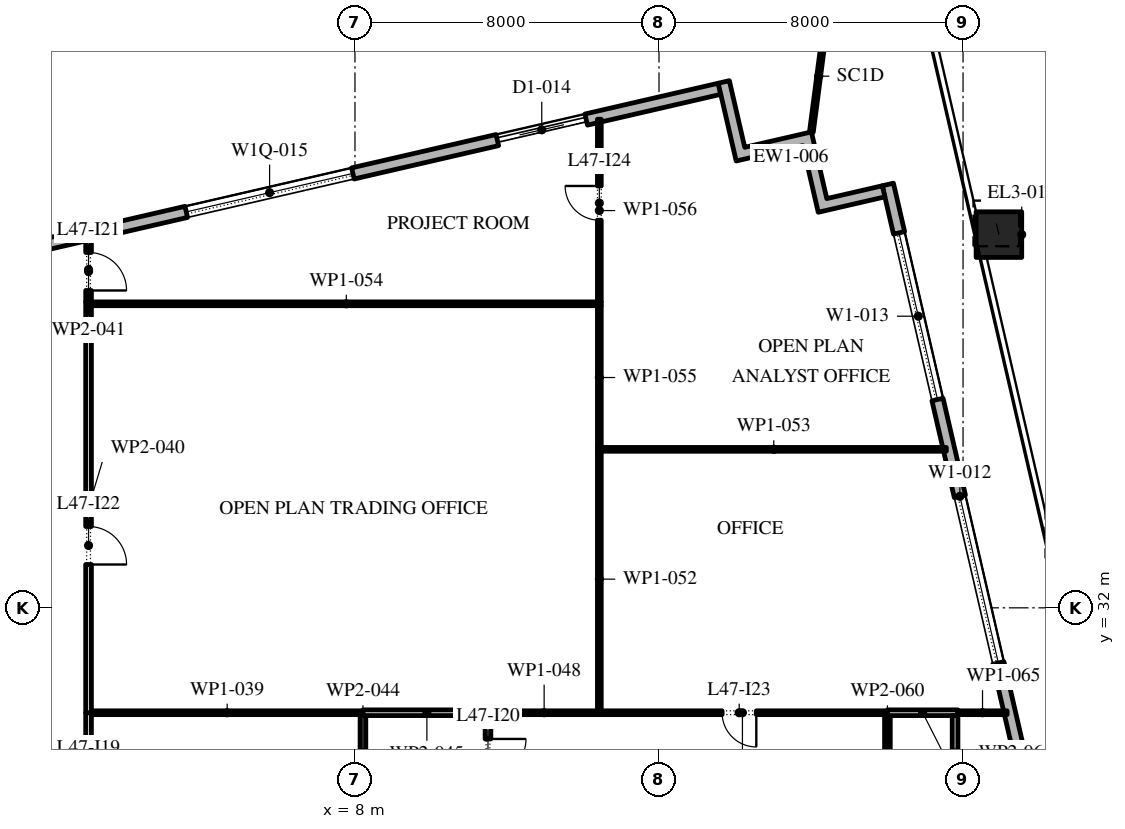
"""IFC4 building model, lengths in metres.
Left out: names, types, materials, properties, quantities, classifications, styles, units other than length and angle.
Written with IfcOpenShell. Run it as: python <this file> out.ifc"""

import sys

from ifc_helpers import new_model, si_unit, direction, frame, frame_2d, origin, origin_2d, place, context, subcontext, project, spatial, polyline, rectangle, outline, extrude, element, fill, save


model = new_model("IFC4")
c1 = context("Model", 3, precision=1e-05, world=origin(), true_north=direction((0.0, 1.0)))
c2 = subcontext(c1, "Body", "Model", "MODEL_VIEW")
j1 = project(units=[si_unit("LENGTHUNIT", "METRE"), si_unit("PLANEANGLEUNIT", "RADIAN")], contexts=[c1])
p1 = place(None, origin())
s1 = spatial("IfcSite", under=j1, at=p1, CompositionType="ELEMENT")
p2 = place(p1, origin())
s2 = spatial("IfcBuilding", under=s1, at=p2, CompositionType="ELEMENT")
p3 = place(p2, frame((0.0, 0.0, 213.6)))
s3 = spatial("IfcBuildingStorey", under=s2, at=p3, CompositionType="ELEMENT", Elevation=213.6)
p4 = place(p3, frame((26.828, 33.658, 0.0), z_axis=(-0.013461799865, 0.058373149415, 0.998204064995), x_axis=(-0.974423835271, -0.224718021653, 0.0)))
e1 = element("IfcColumn", 1, at=p4, inside=s3, PredefinedType="COLUMN", context=c2, shape_type="SweptSolid", body=[
    extrude(rectangle(XDim=1.2, YDim=1.2, at=origin_2d()), origin(), (0.0, 0.0, 1.0), 4.208),
])
p5 = place(p3, frame((24.944, 41.82, 0.0), z_axis=(-0.016118248597, 0.069981028979, 0.997418095708), x_axis=(-0.974486358888, -0.224446733862, 0.0)))
e2 = element("IfcColumn", 2, at=p5, inside=s3, PredefinedType="COLUMN", context=c2, shape_type="SweptSolid", body=[
    extrude(rectangle(XDim=1.2, YDim=1.2, at=origin_2d()), origin(), (0.0, 0.0, 1.0), 4.211),
])
p6 = place(p3, frame((33.157, -5.092, 0.0), z_axis=(0.0, 0.0, 1.0), x_axis=(-0.224950279389, 0.974370243697, 0.0)))
e3 = element("IfcWall", 3, at=p6, inside=s3, PredefinedType="STANDARD", context=c2, shape_type="SweptSolid", body=[
    extrude(rectangle(XDim=49.5, YDim=0.3, at=frame_2d((24.75, 0.0))), origin(), (0.0, 0.0, 1.0), 4.0),
])
p7 = place(p6, frame((2.207, 0.0, 0.0)))
e4 = element("IfcOpeningElement", 4, at=p7, cuts=e3, PredefinedType="OPENING", context=c2, shape_type="SweptSolid", body=[
    extrude(rectangle(XDim=2.4, YDim=3.125, at=frame_2d((1.2, 1.562))), frame((0.0, 0.16, 0.0), z_axis=(0.0, -1.0, 0.0), x_axis=(1.0, 0.0, 0.0)), (0.0, 0.0, 1.0), 0.32),
])
p8 = place(p6, frame((8.121, 0.0, 0.45)))
e5 = element("IfcOpeningElement", 5, at=p8, cuts=e3, PredefinedType="OPENING", context=c2, shape_type="SweptSolid", body=[
    extrude(rectangle(XDim=4.5, YDim=2.875, at=frame_2d((2.25, 1.438))), frame((0.0, 0.16, 0.0), z_axis=(0.0, -1.0, 0.0), x_axis=(1.0, 0.0, 0.0)), (0.0, 0.0, 1.0), 0.32),
])
p9 = place(p6, frame((15.236, 0.0, 0.45)))
e6 = element("IfcOpeningElement", 6, at=p9, cuts=e3, PredefinedType="OPENING", context=c2, shape_type="SweptSolid", body=[
    extrude(rectangle(XDim=4.5, YDim=2.875, at=frame_2d((2.25, 1.438))), frame((0.0, 0.16, 0.0), z_axis=(0.0, -1.0, 0.0), x_axis=(1.0, 0.0, 0.0)), (0.0, 0.0, 1.0), 0.32),
])
p10 = place(p6, frame((22.35, 0.0, 0.45)))
e7 = element("IfcOpeningElement", 7, at=p10, cuts=e3, PredefinedType="OPENING", context=c2, shape_type="SweptSolid", body=[
    extrude(rectangle(XDim=4.5, YDim=3.0, at=frame_2d((2.25, 1.5))), frame((0.0, 0.16, 0.0), z_axis=(0.0, -1.0, 0.0), x_axis=(1.0, 0.0, 0.0)), (0.0, 0.0, 1.0), 0.32),
])
p11 = place(p6, frame((30.514, 0.0, 0.0)))
e8 = element("IfcOpeningElement", 8, at=p11, cuts=e3, PredefinedType="OPENING", context=c2, shape_type="SweptSolid", body=[
    extrude(rectangle(XDim=2.4, YDim=3.45, at=frame_2d((1.2, 1.725))), frame((0.0, 0.16, 0.0), z_axis=(0.0, -1.0, 0.0), x_axis=(1.0, 0.0, 0.0)), (0.0, 0.0, 1.0), 0.32),
])
p12 = place(p6, frame((36.579, 0.0, 0.45)))
e9 = element("IfcOpeningElement", 9, at=p12, cuts=e3, PredefinedType="OPENING", context=c2, shape_type="SweptSolid", body=[
    extrude(rectangle(XDim=4.5, YDim=3.05, at=frame_2d((2.25, 1.525))), frame((0.0, 0.16, 0.0), z_axis=(0.0, -1.0, 0.0), x_axis=(1.0, 0.0, 0.0)), (0.0, 0.0, 1.0), 0.32),
])
p13 = place(p6, frame((43.693, 0.0, 0.45)))
e10 = element("IfcOpeningElement", 10, at=p13, cuts=e3, PredefinedType="OPENING", context=c2, shape_type="SweptSolid", body=[
    extrude(rectangle(XDim=4.5, YDim=3.05, at=frame_2d((2.25, 1.525))), frame((0.0, 0.16, 0.0), z_axis=(0.0, -1.0, 0.0), x_axis=(1.0, 0.0, 0.0)), (0.0, 0.0, 1.0), 0.32),
])
p14 = place(p3, frame((17.592, 45.657, 0.0), z_axis=(0.0, 0.0, 1.0), x_axis=(-0.974370243697, -0.224950279389, 0.0)))
e11 = element("IfcWall", 11, at=p14, inside=s3, PredefinedType="STANDARD", context=c2, shape_type="SweptSolid", body=[
    extrude(rectangle(XDim=49.5, YDim=0.3, at=frame_2d((24.75, 0.0))), origin(), (0.0, 0.0, 1.0), 4.0),
])
p15 = place(p14, frame((3.6, 0.0, 0.0)))
e12 = element("IfcOpeningElement", 12, at=p15, cuts=e11, PredefinedType="OPENING", context=c2, shape_type="SweptSolid", body=[
    extrude(rectangle(XDim=2.4, YDim=3.5, at=frame_2d((1.2, 1.75))), frame((0.0, 0.16, 0.0), z_axis=(0.0, -1.0, 0.0), x_axis=(1.0, 0.0, 0.0)), (0.0, 0.0, 1.0), 0.32),
])
p16 = place(p14, frame((9.9, 0.0, 0.45)))
e13 = element("IfcOpeningElement", 13, at=p16, cuts=e11, PredefinedType="OPENING", context=c2, shape_type="SweptSolid", body=[
    extrude(rectangle(XDim=4.5, YDim=2.45, at=frame_2d((2.25, 1.225))), frame((0.0, 0.16, 0.0), z_axis=(0.0, -1.0, 0.0), x_axis=(1.0, 0.0, 0.0)), (0.0, 0.0, 1.0), 0.32),
])
p17 = place(p14, frame((18.2, 0.0, 0.45)))
e14 = element("IfcOpeningElement", 14, at=p17, cuts=e11, PredefinedType="OPENING", context=c2, shape_type="SweptSolid", body=[
    extrude(rectangle(XDim=4.5, YDim=2.45, at=frame_2d((2.25, 1.225))), frame((0.0, 0.16, 0.0), z_axis=(0.0, -1.0, 0.0), x_axis=(1.0, 0.0, 0.0)), (0.0, 0.0, 1.0), 0.32),
])
p18 = place(p14, frame((26.5, 0.0, 0.45)))
e15 = element("IfcOpeningElement", 15, at=p18, cuts=e11, PredefinedType="OPENING", context=c2, shape_type="SweptSolid", body=[
    extrude(rectangle(XDim=4.5, YDim=2.45, at=frame_2d((2.25, 1.225))), frame((0.0, 0.16, 0.0), z_axis=(0.0, -1.0, 0.0), x_axis=(1.0, 0.0, 0.0)), (0.0, 0.0, 1.0), 0.32),
])
p19 = place(p14, frame((35.85, 0.0, 0.0)))
e16 = element("IfcOpeningElement", 16, at=p19, cuts=e11, PredefinedType="OPENING", context=c2, shape_type="SweptSolid", body=[
    extrude(rectangle(XDim=2.4, YDim=3.5, at=frame_2d((1.2, 1.75))), frame((0.0, 0.16, 0.0), z_axis=(0.0, -1.0, 0.0), x_axis=(1.0, 0.0, 0.0)), (0.0, 0.0, 1.0), 0.32),
])
p20 = place(p14, frame((43.1, 0.0, 0.45)))
e17 = element("IfcOpeningElement", 17, at=p20, cuts=e11, PredefinedType="OPENING", context=c2, shape_type="SweptSolid", body=[
    extrude(rectangle(XDim=4.5, YDim=2.575, at=frame_2d((2.25, 1.288))), frame((0.0, 0.16, 0.0), z_axis=(0.0, -1.0, 0.0), x_axis=(1.0, 0.0, 0.0)), (0.0, 0.0, 1.0), 0.32),
])
p21 = place(p3, origin())
e18 = element("IfcWall", 18, at=p21, inside=s3, PredefinedType="STANDARD", context=c2, shape_type="SweptSolid", body=[
    extrude(outline(polyline([(19.785, 44.162), (18.031, 43.757), (17.558, 45.803), (17.851, 45.871), (18.256, 44.117), (20.01, 44.522), (20.414, 42.768), (21.876, 43.105), (21.943, 42.813), (20.19, 42.408), (19.785, 44.162)])), origin(), (0.0, 0.0, 1.0), 4.0),
])
p22 = place(p3, frame((20.01, 44.522, -0.05), z_axis=(0.0, 0.0, 1.0), x_axis=(0.129780065945, 0.991542805169, 0.0)))
e19 = element("IfcWall", 19, at=p22, inside=s3, PredefinedType="STANDARD", context=c2, shape_type="SweptSolid", body=[
    extrude(rectangle(XDim=2.959, YDim=0.1, at=frame_2d((1.479, 0.0))), origin(), (0.0, 0.0, 1.0), 3.07),
])
p23 = place(p3, frame((0.99, 29.24, 0.0), z_axis=(0.0, 0.0, 1.0), x_axis=(0.0, -1.0, 0.0)))
e20 = element("IfcWall", 20, at=p23, inside=s3, PredefinedType="PARTITIONING", context=c2, shape_type="SweptSolid", body=[
    extrude(rectangle(XDim=6.93, YDim=0.15, at=frame_2d((3.465, 0.0))), origin(), (0.0, 0.0, 1.0), 4.0),
])
p24 = place(p23, frame((1.53, 0.0, 0.0)))
e21 = element("IfcOpeningElement", 21, at=p24, cuts=e20, PredefinedType="OPENING", context=c2, shape_type="SweptSolid", body=[
    extrude(rectangle(XDim=1.0, YDim=2.1, at=frame_2d((0.5, 1.05))), frame((0.0, 0.085, 0.0), z_axis=(0.0, -1.0, 0.0), x_axis=(1.0, 0.0, 0.0)), (0.0, 0.0, 1.0), 0.17),
])
p25 = place(p3, frame((1.065, 29.24, 0.0), z_axis=(0.0, 0.0, 1.0), x_axis=(1.0, 0.0, 0.0)))
e22 = element("IfcWall", 22, at=p25, inside=s3, PredefinedType="PARTITIONING", context=c2, shape_type="SweptSolid", body=[
    extrude(rectangle(XDim=7.145, YDim=0.1, at=frame_2d((3.573, 0.0))), origin(), (0.0, 0.0, 1.0), 4.0),
])
p26 = place(p3, frame((0.99, 40.05, 0.0), z_axis=(0.0, 0.0, 1.0), x_axis=(0.0, -1.0, 0.0)))
e23 = element("IfcWall", 23, at=p26, inside=s3, PredefinedType="PARTITIONING", context=c2, shape_type="SweptSolid", body=[
    extrude(rectangle(XDim=10.81, YDim=0.15, at=frame_2d((5.405, 0.0))), origin(), (0.0, 0.0, 1.0), 4.0),
])
p27 = place(p26, frame((5.91, 0.0, 0.0)))
e24 = element("IfcOpeningElement", 24, at=p27, cuts=e23, PredefinedType="OPENING", context=c2, shape_type="SweptSolid", body=[
    extrude(rectangle(XDim=1.0, YDim=2.1, at=frame_2d((0.5, 1.05))), frame((0.0, 0.085, 0.0), z_axis=(0.0, -1.0, 0.0), x_axis=(1.0, 0.0, 0.0)), (0.0, 0.0, 1.0), 0.17),
])
p28 = place(p3, frame((0.99, 41.753, 0.0), z_axis=(0.0, 0.0, 1.0), x_axis=(0.0, -1.0, 0.0)))
e25 = element("IfcWall", 25, at=p28, inside=s3, PredefinedType="PARTITIONING", context=c2, shape_type="SweptSolid", body=[
    extrude(rectangle(XDim=1.703, YDim=0.15, at=frame_2d((0.852, 0.0))), origin(), (0.0, 0.0, 1.0), 4.0),
])
p29 = place(p28, frame((0.403, 0.0, 0.0)))
e26 = element("IfcOpeningElement", 26, at=p29, cuts=e25, PredefinedType="OPENING", context=c2, shape_type="SweptSolid", body=[
    extrude(rectangle(XDim=1.0, YDim=2.1, at=frame_2d((0.5, 1.05))), frame((0.0, 0.085, 0.0), z_axis=(0.0, -1.0, 0.0), x_axis=(1.0, 0.0, 0.0)), (0.0, 0.0, 1.0), 0.17),
])
p30 = place(p3, frame((8.21, 27.2, 0.0), z_axis=(0.0, 0.0, 1.0), x_axis=(0.0, 1.0, 0.0)))
e27 = element("IfcWall", 27, at=p30, inside=s3, PredefinedType="PARTITIONING", context=c2, shape_type="SweptSolid", body=[
    extrude(rectangle(XDim=1.99, YDim=0.15, at=frame_2d((0.995, 0.0))), origin(), (0.0, 0.0, 1.0), 4.0),
])
p31 = place(p3, frame((8.21, 29.24, 0.0), z_axis=(0.0, 0.0, 1.0), x_axis=(1.0, 0.0, 0.0)))
e28 = element("IfcWall", 28, at=p31, inside=s3, PredefinedType="PARTITIONING", context=c2, shape_type="SweptSolid", body=[
    extrude(rectangle(XDim=3.365, YDim=0.15, at=frame_2d((1.683, 0.0))), origin(), (0.0, 0.0, 1.0), 4.0),
])
p32 = place(p3, frame((11.5, 29.165, 0.0), z_axis=(0.0, 0.0, 1.0), x_axis=(0.0, -1.0, 0.0)))
e29 = element("IfcWall", 29, at=p32, inside=s3, PredefinedType="PARTITIONING", context=c2, shape_type="SweptSolid", body=[
    extrude(rectangle(XDim=3.765, YDim=0.15, at=frame_2d((1.883, 0.0))), origin(), (0.0, 0.0, 1.0), 4.0),
])
p33 = place(p32, frame((0.615, 0.0, 0.0)))
e30 = element("IfcOpeningElement", 30, at=p33, cuts=e29, PredefinedType="OPENING", context=c2, shape_type="SweptSolid", body=[
    extrude(rectangle(XDim=1.0, YDim=2.1, at=frame_2d((0.5, 1.05))), frame((0.0, 0.085, 0.0), z_axis=(0.0, -1.0, 0.0), x_axis=(1.0, 0.0, 0.0)), (0.0, 0.0, 1.0), 0.17),
])
p34 = place(p3, frame((11.575, 29.24, 0.0), z_axis=(0.0, 0.0, 1.0), x_axis=(1.0, 0.0, 0.0)))
e31 = element("IfcWall", 31, at=p34, inside=s3, PredefinedType="PARTITIONING", context=c2, shape_type="SweptSolid", body=[
    extrude(rectangle(XDim=2.805, YDim=0.1, at=frame_2d((1.402, 0.0))), origin(), (0.0, 0.0, 1.0), 4.0),
])
p35 = place(p3, frame((14.38, 29.24, 0.0), z_axis=(0.0, 0.0, 1.0), x_axis=(1.0, 0.0, 0.0)))
e32 = element("IfcWall", 32, at=p35, inside=s3, PredefinedType="PARTITIONING", context=c2, shape_type="SweptSolid", body=[
    extrude(rectangle(XDim=7.63, YDim=0.1, at=frame_2d((3.815, 0.0))), origin(), (0.0, 0.0, 1.0), 4.0),
])
p36 = place(p35, frame((3.28, 0.0, 0.0)))
e33 = element("IfcOpeningElement", 33, at=p36, cuts=e32, PredefinedType="OPENING", context=c2, shape_type="SweptSolid", body=[
    extrude(rectangle(XDim=0.9, YDim=2.1, at=frame_2d((0.45, 1.05))), frame((0.0, 0.06, 0.0), z_axis=(0.0, -1.0, 0.0), x_axis=(1.0, 0.0, 0.0)), (0.0, 0.0, 1.0), 0.12),
])
p37 = place(p3, frame((14.43, 36.22, 0.0), z_axis=(0.0, 0.0, 1.0), x_axis=(0.0, -1.0, 0.0)))
e34 = element("IfcWall", 34, at=p37, inside=s3, PredefinedType="PARTITIONING", context=c2, shape_type="SweptSolid", body=[
    extrude(rectangle(XDim=6.93, YDim=0.1, at=frame_2d((3.465, 0.0))), origin(), (0.0, 0.0, 1.0), 4.0),
])
p38 = place(p3, frame((14.48, 36.17, 0.0), z_axis=(0.0, 0.0, 1.0), x_axis=(1.0, 0.0, 0.0)))
e35 = element("IfcWall", 35, at=p38, inside=s3, PredefinedType="PARTITIONING", context=c2, shape_type="SweptSolid", body=[
    extrude(rectangle(XDim=9.08, YDim=0.1, at=frame_2d((4.54, 0.0))), origin(), (0.0, 0.0, 1.0), 4.0),
])
p39 = place(p3, frame((14.48, 40.0, 0.0), z_axis=(0.0, 0.0, 1.0), x_axis=(-1.0, 0.0, 0.0)))
e36 = element("IfcWall", 36, at=p39, inside=s3, PredefinedType="PARTITIONING", context=c2, shape_type="SweptSolid", body=[
    extrude(rectangle(XDim=13.415, YDim=0.1, at=frame_2d((6.708, 0.0))), origin(), (0.0, 0.0, 1.0), 4.0),
])
p40 = place(p3, frame((14.43, 39.95, 0.0), z_axis=(0.0, 0.0, 1.0), x_axis=(0.0, -1.0, 0.0)))
e37 = element("IfcWall", 37, at=p40, inside=s3, PredefinedType="PARTITIONING", context=c2, shape_type="SweptSolid", body=[
    extrude(rectangle(XDim=3.78, YDim=0.1, at=frame_2d((1.89, 0.0))), origin(), (0.0, 0.0, 1.0), 4.0),
])
p41 = place(p3, frame((14.43, 44.856, 0.0), z_axis=(0.0, 0.0, 1.0), x_axis=(0.0, -1.0, 0.0)))
e38 = element("IfcWall", 38, at=p41, inside=s3, PredefinedType="PARTITIONING", context=c2, shape_type="SweptSolid", body=[
    extrude(rectangle(XDim=4.806, YDim=0.1, at=frame_2d((2.403, 0.0))), origin(), (0.0, 0.0, 1.0), 4.0),
])
p42 = place(p41, frame((1.756, 0.0, 0.0)))
e39 = element("IfcOpeningElement", 39, at=p42, cuts=e38, PredefinedType="OPENING", context=c2, shape_type="SweptSolid", body=[
    extrude(rectangle(XDim=0.9, YDim=2.1, at=frame_2d((0.45, 1.05))), frame((0.0, 0.06, 0.0), z_axis=(0.0, -1.0, 0.0), x_axis=(1.0, 0.0, 0.0)), (0.0, 0.0, 1.0), 0.12),
])
p43 = place(p3, frame((22.01, 27.2, 0.0), z_axis=(0.0, 0.0, 1.0), x_axis=(0.0, 1.0, 0.0)))
e40 = element("IfcWall", 40, at=p43, inside=s3, PredefinedType="PARTITIONING", context=c2, shape_type="SweptSolid", body=[
    extrude(rectangle(XDim=1.99, YDim=0.15, at=frame_2d((0.995, 0.0))), origin(), (0.0, 0.0, 1.0), 4.0),
])
p44 = place(p3, frame((22.01, 29.24, 0.0), z_axis=(0.0, 0.0, 1.0), x_axis=(1.0, 0.0, 0.0)))
e41 = element("IfcWall", 41, at=p44, inside=s3, PredefinedType="PARTITIONING", context=c2, shape_type="SweptSolid", body=[
    extrude(rectangle(XDim=1.855, YDim=0.15, at=frame_2d((0.927, 0.0))), origin(), (0.0, 0.0, 1.0), 4.0),
])
p45 = place(p3, frame((23.79, 29.165, 0.0), z_axis=(0.0, 0.0, 1.0), x_axis=(0.0, -1.0, 0.0)))
e42 = element("IfcWall", 42, at=p45, inside=s3, PredefinedType="PARTITIONING", context=c2, shape_type="SweptSolid", body=[
    extrude(rectangle(XDim=1.965, YDim=0.15, at=frame_2d((0.982, 0.0))), origin(), (0.0, 0.0, 1.0), 4.0),
])
p46 = place(p3, frame((23.865, 29.24, 0.0), z_axis=(0.0, 0.0, 1.0), x_axis=(1.0, 0.0, 0.0)))
e43 = element("IfcWall", 43, at=p46, inside=s3, PredefinedType="PARTITIONING", context=c2, shape_type="SweptSolid", body=[
    extrude(rectangle(XDim=1.295, YDim=0.1, at=frame_2d((0.647, 0.0))), origin(), (0.0, 0.0, 1.0), 4.0),
])
p47 = place(p12, origin())
e44 = element("IfcWindow", 44, at=p47, inside=s3, PartitioningType="DOUBLE_PANEL_VERTICAL", PredefinedType="WINDOW", context=c2, shape_type="SweptSolid", body=[
    extrude(rectangle(XDim=4.5, YDim=3.05, at=frame_2d((2.25, 1.525))), frame((0.0, 0.03, 0.0), z_axis=(0.0, -1.0, 0.0), x_axis=(1.0, 0.0, 0.0)), (0.0, 0.0, 1.0), 0.06),
])
fill(e9, e44)
p48 = place(p13, origin())
e45 = element("IfcWindow", 45, at=p48, inside=s3, PartitioningType="DOUBLE_PANEL_VERTICAL", PredefinedType="WINDOW", context=c2, shape_type="SweptSolid", body=[
    extrude(rectangle(XDim=4.5, YDim=3.05, at=frame_2d((2.25, 1.525))), frame((0.0, 0.03, 0.0), z_axis=(0.0, -1.0, 0.0), x_axis=(1.0, 0.0, 0.0)), (0.0, 0.0, 1.0), 0.06),
])
fill(e10, e45)
p49 = place(p15, origin())
e46 = element("IfcDoor", 46, at=p49, inside=s3, OperationType="DOUBLE_DOOR_SLIDING", PredefinedType="DOOR", context=c2, shape_type="SweptSolid", body=[
    extrude(rectangle(XDim=2.4, YDim=3.5, at=frame_2d((1.2, 1.75))), frame((0.0, 0.025, 0.0), z_axis=(0.0, -1.0, 0.0), x_axis=(1.0, 0.0, 0.0)), (0.0, 0.0, 1.0), 0.05),
])
fill(e12, e46)
p50 = place(p16, origin())
e47 = element("IfcWindow", 47, at=p50, inside=s3, PartitioningType="DOUBLE_PANEL_VERTICAL", PredefinedType="WINDOW", context=c2, shape_type="SweptSolid", body=[
    extrude(rectangle(XDim=4.5, YDim=2.45, at=frame_2d((2.25, 1.225))), frame((0.0, 0.03, 0.0), z_axis=(0.0, -1.0, 0.0), x_axis=(1.0, 0.0, 0.0)), (0.0, 0.0, 1.0), 0.06),
])
fill(e13, e47)
p51 = place(p33, origin())
e48 = element("IfcDoor", 48, at=p51, inside=s3, OperationType="SINGLE_SWING_RIGHT", PredefinedType="DOOR", context=c2, shape_type="SweptSolid", body=[
    extrude(rectangle(XDim=1.0, YDim=2.1, at=frame_2d((0.5, 1.05))), frame((0.0, 0.025, 0.0), z_axis=(0.0, -1.0, 0.0), x_axis=(1.0, 0.0, 0.0)), (0.0, 0.0, 1.0), 0.05),
])
fill(e30, e48)
p52 = place(p29, origin())
e49 = element("IfcDoor", 49, at=p52, inside=s3, OperationType="SINGLE_SWING_LEFT", PredefinedType="DOOR", context=c2, shape_type="SweptSolid", body=[
    extrude(rectangle(XDim=1.0, YDim=2.1, at=frame_2d((0.5, 1.05))), frame((0.0, 0.025, 0.0), z_axis=(0.0, -1.0, 0.0), x_axis=(1.0, 0.0, 0.0)), (0.0, 0.0, 1.0), 0.05),
])
fill(e26, e49)
p53 = place(p27, origin())
e50 = element("IfcDoor", 50, at=p53, inside=s3, OperationType="SINGLE_SWING_LEFT", PredefinedType="DOOR", context=c2, shape_type="SweptSolid", body=[
    extrude(rectangle(XDim=1.0, YDim=2.1, at=frame_2d((0.5, 1.05))), frame((0.0, 0.025, 0.0), z_axis=(0.0, -1.0, 0.0), x_axis=(1.0, 0.0, 0.0)), (0.0, 0.0, 1.0), 0.05),
])
fill(e24, e50)
p54 = place(p36, frame((0.9, 0.0, 0.0), z_axis=(0.0, 0.0, 1.0), x_axis=(-1.0, 0.0, 0.0)))
e51 = element("IfcDoor", 51, at=p54, inside=s3, OperationType="SINGLE_SWING_RIGHT", PredefinedType="DOOR", context=c2, shape_type="SweptSolid", body=[
    extrude(rectangle(XDim=0.9, YDim=2.1, at=frame_2d((0.45, 1.05))), frame((0.0, 0.025, 0.0), z_axis=(0.0, -1.0, 0.0), x_axis=(1.0, 0.0, 0.0)), (0.0, 0.0, 1.0), 0.05),
])
fill(e33, e51)
p55 = place(p42, frame((0.9, 0.0, 0.0), z_axis=(0.0, 0.0, 1.0), x_axis=(-1.0, 0.0, 0.0)))
e52 = element("IfcDoor", 52, at=p55, inside=s3, OperationType="SINGLE_SWING_LEFT", PredefinedType="DOOR", context=c2, shape_type="SweptSolid", body=[
    extrude(rectangle(XDim=0.9, YDim=2.1, at=frame_2d((0.45, 1.05))), frame((0.0, 0.025, 0.0), z_axis=(0.0, -1.0, 0.0), x_axis=(1.0, 0.0, 0.0)), (0.0, 0.0, 1.0), 0.05),
])
fill(e39, e52)
save(model, sys.argv[1])
